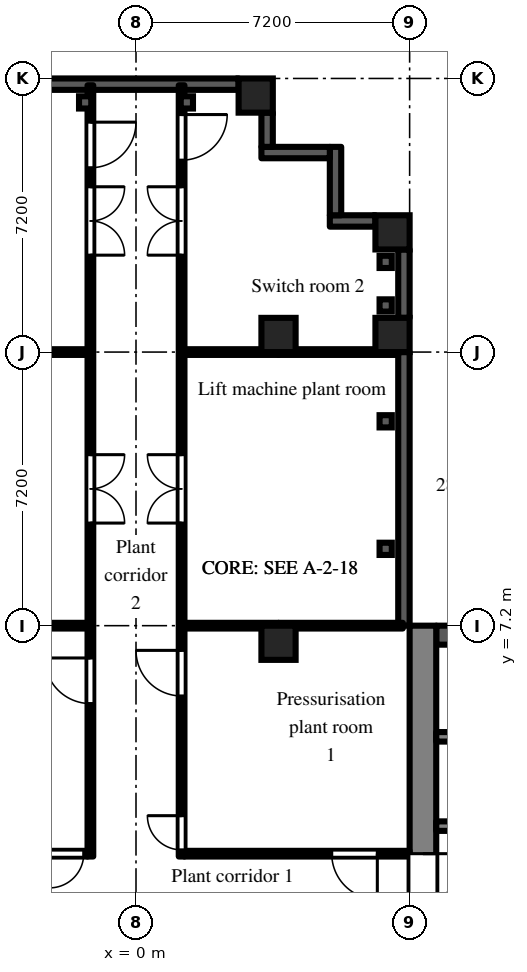
"""IFC4 building model, lengths in metres.
Left out: names, types, materials, properties, quantities, classifications, styles, units other than length and angle.
Written with IfcOpenShell. Run it as: python <this file> out.ifc"""

import sys

from ifc_helpers import new_model, si_unit, direction, frame, frame_2d, origin, origin_2d, place, context, subcontext, project, spatial, rectangle, extrude, element, fill, save


model = new_model("IFC4")
c1 = context("Model", 3, precision=1e-05, world=origin(), true_north=direction((0.0, 1.0)))
c2 = subcontext(c1, "Body", "Model", "MODEL_VIEW")
j1 = project(units=[si_unit("LENGTHUNIT", "METRE"), si_unit("PLANEANGLEUNIT", "RADIAN")], contexts=[c1])
p1 = place(None, origin())
s1 = spatial("IfcSite", under=j1, at=p1, CompositionType="ELEMENT")
p2 = place(p1, origin())
s2 = spatial("IfcBuilding", under=s1, at=p2, CompositionType="ELEMENT")
p3 = place(p2, frame((0.0, 0.0, 111.9)))
s3 = spatial("IfcBuildingStorey", under=s2, at=p3, CompositionType="ELEMENT", Elevation=111.9)
for number, where, z_axis, x_axis in (
    (1, (3.15, 21.15, 0.0), (0.0, 0.0, 1.0), (1.0, 0.0, 0.0)),
    (2, (3.75, 6.75, 0.0), (0.0, 0.0, 1.0), (1.0, 0.0, 0.0)),
    (3, (3.75, 14.85, 0.0), (0.0, 0.0, 1.0), (1.0, 0.0, 0.0)),
    (4, (6.75, 14.85, 0.0), (0.0, 0.0, 1.0), (1.0, 0.0, 0.0)),
    (5, (6.75, 17.55, 0.0), (0.0, 0.0, 1.0), (1.0, 0.0, 0.0)),
):
    element("IfcColumn", number, at=place(p3, frame(where, z_axis=z_axis, x_axis=x_axis)), inside=s3, PredefinedType="COLUMN", context=c2, shape_type="SweptSolid", body=[
        extrude(rectangle(XDim=0.9, YDim=0.9, at=origin_2d()), origin(), (0.0, 0.0, 1.0), 4.2),
    ])
p4 = place(p3, frame((7.05, 7.2, 0.0), z_axis=(0.0, 0.0, 1.0), x_axis=(0.0, 1.0, 0.0)))
e6 = element("IfcWall", 6, at=p4, inside=s3, PredefinedType="SOLIDWALL", context=c2, shape_type="SweptSolid", body=[
    extrude(rectangle(XDim=7.2, YDim=0.3, at=frame_2d((3.6, 0.0))), origin(), (0.0, 0.0, 1.0), 3.8),
])
p5 = place(p3, frame((7.05, 15.3, 0.0), z_axis=(0.0, 0.0, 1.0), x_axis=(0.0, 1.0, 0.0)))
e7 = element("IfcWall", 7, at=p5, inside=s3, PredefinedType="SOLIDWALL", context=c2, shape_type="SweptSolid", body=[
    extrude(rectangle(XDim=1.8, YDim=0.3, at=frame_2d((0.9, 0.0))), origin(), (0.0, 0.0, 1.0), 3.4),
])
p6 = place(p3, frame((6.3, 17.85, 0.0), z_axis=(0.0, 0.0, 1.0), x_axis=(-1.0, 0.0, 0.0)))
e8 = element("IfcWall", 8, at=p6, inside=s3, PredefinedType="SOLIDWALL", context=c2, shape_type="SweptSolid", body=[
    extrude(rectangle(XDim=1.2, YDim=0.3, at=frame_2d((0.6, 0.0))), origin(), (0.0, 0.0, 1.0), 3.8),
])
for number, where, z_axis, x_axis in (
    (9, (5.25, 18.0, 0.0), (0.0, 0.0, 1.0), (0.0, 1.0, 0.0)),
    (10, (5.1, 19.65, 0.0), (0.0, 0.0, 1.0), (-1.0, 0.0, 0.0)),
):
    element("IfcWall", number, at=place(p3, frame(where, z_axis=z_axis, x_axis=x_axis)), inside=s3, PredefinedType="SOLIDWALL", context=c2, shape_type="SweptSolid", body=[
        extrude(rectangle(XDim=1.8, YDim=0.3, at=frame_2d((0.9, 0.0))), origin(), (0.0, 0.0, 1.0), 3.8),
    ])
p7 = place(p3, frame((3.45, 19.8, 0.0), z_axis=(0.0, 0.0, 1.0), x_axis=(0.0, 1.0, 0.0)))
e11 = element("IfcWall", 11, at=p7, inside=s3, PredefinedType="SOLIDWALL", context=c2, shape_type="SweptSolid", body=[
    extrude(rectangle(XDim=0.9, YDim=0.3, at=frame_2d((0.45, 0.0))), origin(), (0.0, 0.0, 1.0), 3.8),
])
p8 = place(p3, frame((2.7, 21.45, 0.0), z_axis=(0.0, 0.0, 1.0), x_axis=(-1.0, 0.0, 0.0)))
e12 = element("IfcWall", 12, at=p8, inside=s3, PredefinedType="SOLIDWALL", context=c2, shape_type="SweptSolid", body=[
    extrude(rectangle(XDim=5.4, YDim=0.3, at=frame_2d((2.7, 0.0))), origin(), (0.0, 0.0, 1.0), 3.4),
])
p9 = place(p3, frame((7.55, -7.2, 0.0), z_axis=(0.0, 0.0, 1.0), x_axis=(0.0, 1.0, 0.0)))
e13 = element("IfcWall", 13, at=p9, inside=s3, PredefinedType="SHEAR", context=c2, shape_type="SweptSolid", body=[
    extrude(rectangle(XDim=14.4, YDim=0.7, at=frame_2d((7.2, 0.0))), origin(), (0.0, 0.0, 1.0), 3.8),
])
p10 = place(p9, frame((6.0, 0.0, 0.0)))
e14 = element("IfcOpeningElement", 14, at=p10, cuts=e13, PredefinedType="OPENING", context=c2, shape_type="SweptSolid", body=[
    extrude(rectangle(XDim=2.4, YDim=2.2, at=frame_2d((1.2, 1.1))), frame((0.0, 0.36, 0.0), z_axis=(0.0, -1.0, 0.0), x_axis=(1.0, 0.0, 0.0)), (0.0, 0.0, 1.0), 0.72),
])
p11 = place(p3, frame((7.9, 6.95, 0.0), z_axis=(0.0, 0.0, 1.0), x_axis=(1.0, 0.0, 0.0)))
e15 = element("IfcWall", 15, at=p11, inside=s3, PredefinedType="SHEAR", context=c2, shape_type="SweptSolid", body=[
    extrude(rectangle(XDim=12.95, YDim=0.5, at=frame_2d((6.475, 0.0))), origin(), (0.0, 0.0, 1.0), 3.8),
])
p12 = place(p3, frame((7.9, 1.925, 0.0), z_axis=(0.0, 0.0, 1.0), x_axis=(1.0, 0.0, 0.0)))
e16 = element("IfcWall", 16, at=p12, inside=s3, PredefinedType="SHEAR", context=c2, shape_type="SweptSolid", body=[
    extrude(rectangle(XDim=12.95, YDim=0.25, at=frame_2d((6.475, 0.0))), origin(), (0.0, 0.0, 1.0), 3.8),
])
p13 = place(p12, frame((0.525, 0.0, 0.0)))
e17 = element("IfcOpeningElement", 17, at=p13, cuts=e16, PredefinedType="OPENING", context=c2, shape_type="SweptSolid", body=[
    extrude(rectangle(XDim=0.9, YDim=2.1, at=frame_2d((0.45, 1.05))), frame((0.0, 0.135, 0.0), z_axis=(0.0, -1.0, 0.0), x_axis=(1.0, 0.0, 0.0)), (0.0, 0.0, 1.0), 0.27),
])
p14 = place(p12, frame((2.625, 0.0, 0.0)))
e18 = element("IfcOpeningElement", 18, at=p14, cuts=e16, PredefinedType="OPENING", context=c2, shape_type="SweptSolid", body=[
    extrude(rectangle(XDim=1.1, YDim=2.1, at=frame_2d((0.55, 1.05))), frame((0.0, 0.135, 0.0), z_axis=(0.0, -1.0, 0.0), x_axis=(1.0, 0.0, 0.0)), (0.0, 0.0, 1.0), 0.27),
])
p15 = place(p3, frame((7.9, 4.275, 0.0), z_axis=(0.0, 0.0, 1.0), x_axis=(1.0, 0.0, 0.0)))
e19 = element("IfcWall", 19, at=p15, inside=s3, PredefinedType="SHEAR", context=c2, shape_type="SweptSolid", body=[
    extrude(rectangle(XDim=1.95, YDim=0.25, at=frame_2d((0.975, 0.0))), origin(), (0.0, 0.0, 1.0), 3.8),
])
p16 = place(p3, frame((-7.2, 1.2, 0.0), z_axis=(0.0, 0.0, 1.0), x_axis=(1.0, 0.0, 0.0)))
e20 = element("IfcWall", 20, at=p16, inside=s3, PredefinedType="PARTITIONING", context=c2, shape_type="SweptSolid", body=[
    extrude(rectangle(XDim=5.925, YDim=0.15, at=frame_2d((2.962, 0.0))), origin(), (0.0, 0.0, 1.0), 3.8),
])
p17 = place(p16, frame((0.65, 0.0, 0.0)))
e21 = element("IfcOpeningElement", 21, at=p17, cuts=e20, PredefinedType="OPENING", context=c2, shape_type="SweptSolid", body=[
    extrude(rectangle(XDim=1.2, YDim=2.1, at=frame_2d((0.6, 1.05))), frame((0.0, 0.085, 0.0), z_axis=(0.0, -1.0, 0.0), x_axis=(1.0, 0.0, 0.0)), (0.0, 0.0, 1.0), 0.17),
])
p18 = place(p16, frame((4.925, 0.0, 0.0)))
e22 = element("IfcOpeningElement", 22, at=p18, cuts=e20, PredefinedType="OPENING", context=c2, shape_type="SweptSolid", body=[
    extrude(rectangle(XDim=0.9, YDim=2.1, at=frame_2d((0.45, 1.05))), frame((0.0, 0.085, 0.0), z_axis=(0.0, -1.0, 0.0), x_axis=(1.0, 0.0, 0.0)), (0.0, 0.0, 1.0), 0.17),
])
p19 = place(p3, frame((-1.2, 1.125, 0.0), z_axis=(0.0, 0.0, 1.0), x_axis=(0.0, 1.0, 0.0)))
e23 = element("IfcWall", 23, at=p19, inside=s3, PredefinedType="PARTITIONING", context=c2, shape_type="SweptSolid", body=[
    extrude(rectangle(XDim=20.295, YDim=0.15, at=frame_2d((10.147, 0.0))), origin(), (0.0, 0.0, 1.0), 3.8),
])
p20 = place(p19, frame((4.025, 0.0, 0.0)))
e24 = element("IfcOpeningElement", 24, at=p20, cuts=e23, PredefinedType="OPENING", context=c2, shape_type="SweptSolid", body=[
    extrude(rectangle(XDim=1.2, YDim=2.1, at=frame_2d((0.6, 1.05))), frame((0.0, 0.085, 0.0), z_axis=(0.0, -1.0, 0.0), x_axis=(1.0, 0.0, 0.0)), (0.0, 0.0, 1.0), 0.17),
])
p21 = place(p19, frame((8.775, 0.0, 0.0)))
e25 = element("IfcOpeningElement", 25, at=p21, cuts=e23, PredefinedType="OPENING", context=c2, shape_type="SweptSolid", body=[
    extrude(rectangle(XDim=1.8, YDim=2.1, at=frame_2d((0.9, 1.05))), frame((0.0, 0.085, 0.0), z_axis=(0.0, -1.0, 0.0), x_axis=(1.0, 0.0, 0.0)), (0.0, 0.0, 1.0), 0.17),
])
p22 = place(p19, frame((15.825, 0.0, 0.0)))
e26 = element("IfcOpeningElement", 26, at=p22, cuts=e23, PredefinedType="OPENING", context=c2, shape_type="SweptSolid", body=[
    extrude(rectangle(XDim=1.8, YDim=2.1, at=frame_2d((0.9, 1.05))), frame((0.0, 0.085, 0.0), z_axis=(0.0, -1.0, 0.0), x_axis=(1.0, 0.0, 0.0)), (0.0, 0.0, 1.0), 0.17),
])
p23 = place(p19, frame((18.125, 0.0, 0.0)))
e27 = element("IfcOpeningElement", 27, at=p23, cuts=e23, PredefinedType="OPENING", context=c2, shape_type="SweptSolid", body=[
    extrude(rectangle(XDim=1.2, YDim=2.1, at=frame_2d((0.6, 1.05))), frame((0.0, 0.085, 0.0), z_axis=(0.0, -1.0, 0.0), x_axis=(1.0, 0.0, 0.0)), (0.0, 0.0, 1.0), 0.17),
])
p24 = place(p3, frame((1.2, 1.125, 0.0), z_axis=(0.0, 0.0, 1.0), x_axis=(0.0, 1.0, 0.0)))
e28 = element("IfcWall", 28, at=p24, inside=s3, PredefinedType="PARTITIONING", context=c2, shape_type="SweptSolid", body=[
    extrude(rectangle(XDim=20.295, YDim=0.15, at=frame_2d((10.147, 0.0))), origin(), (0.0, 0.0, 1.0), 3.8),
])
p25 = place(p24, frame((0.175, 0.0, 0.0)))
e29 = element("IfcOpeningElement", 29, at=p25, cuts=e28, PredefinedType="OPENING", context=c2, shape_type="SweptSolid", body=[
    extrude(rectangle(XDim=0.9, YDim=2.1, at=frame_2d((0.45, 1.05))), frame((0.0, 0.085, 0.0), z_axis=(0.0, -1.0, 0.0), x_axis=(1.0, 0.0, 0.0)), (0.0, 0.0, 1.0), 0.17),
])
p26 = place(p24, frame((4.225, 0.0, 0.0)))
e30 = element("IfcOpeningElement", 30, at=p26, cuts=e28, PredefinedType="OPENING", context=c2, shape_type="SweptSolid", body=[
    extrude(rectangle(XDim=1.2, YDim=2.1, at=frame_2d((0.6, 1.05))), frame((0.0, 0.085, 0.0), z_axis=(0.0, -1.0, 0.0), x_axis=(1.0, 0.0, 0.0)), (0.0, 0.0, 1.0), 0.17),
])
p27 = place(p24, frame((8.775, 0.0, 0.0)))
e31 = element("IfcOpeningElement", 31, at=p27, cuts=e28, PredefinedType="OPENING", context=c2, shape_type="SweptSolid", body=[
    extrude(rectangle(XDim=1.8, YDim=2.1, at=frame_2d((0.9, 1.05))), frame((0.0, 0.085, 0.0), z_axis=(0.0, -1.0, 0.0), x_axis=(1.0, 0.0, 0.0)), (0.0, 0.0, 1.0), 0.17),
])
p28 = place(p24, frame((15.825, 0.0, 0.0)))
e32 = element("IfcOpeningElement", 32, at=p28, cuts=e28, PredefinedType="OPENING", context=c2, shape_type="SweptSolid", body=[
    extrude(rectangle(XDim=1.8, YDim=2.1, at=frame_2d((0.9, 1.05))), frame((0.0, 0.085, 0.0), z_axis=(0.0, -1.0, 0.0), x_axis=(1.0, 0.0, 0.0)), (0.0, 0.0, 1.0), 0.17),
])
p29 = place(p24, frame((18.325, 0.0, 0.0)))
e33 = element("IfcOpeningElement", 33, at=p29, cuts=e28, PredefinedType="OPENING", context=c2, shape_type="SweptSolid", body=[
    extrude(rectangle(XDim=1.2, YDim=2.1, at=frame_2d((0.6, 1.05))), frame((0.0, 0.085, 0.0), z_axis=(0.0, -1.0, 0.0), x_axis=(1.0, 0.0, 0.0)), (0.0, 0.0, 1.0), 0.17),
])
p30 = place(p3, frame((1.275, 1.2, 0.0), z_axis=(0.0, 0.0, 1.0), x_axis=(1.0, 0.0, 0.0)))
e34 = element("IfcWall", 34, at=p30, inside=s3, PredefinedType="PARTITIONING", context=c2, shape_type="SweptSolid", body=[
    extrude(rectangle(XDim=5.925, YDim=0.15, at=frame_2d((2.962, 0.0))), origin(), (0.0, 0.0, 1.0), 3.8),
])
p31 = place(p30, frame((3.875, 0.0, 0.0)))
e35 = element("IfcOpeningElement", 35, at=p31, cuts=e34, PredefinedType="OPENING", context=c2, shape_type="SweptSolid", body=[
    extrude(rectangle(XDim=1.2, YDim=2.1, at=frame_2d((0.6, 1.05))), frame((0.0, 0.085, 0.0), z_axis=(0.0, -1.0, 0.0), x_axis=(1.0, 0.0, 0.0)), (0.0, 0.0, 1.0), 0.17),
])
for number, where, z_axis, x_axis in (
    (36, (1.275, 7.2, 0.0), (0.0, 0.0, 1.0), (1.0, 0.0, 0.0)),
    (37, (1.275, 14.4, 0.0), (0.0, 0.0, 1.0), (1.0, 0.0, 0.0)),
    (38, (-3.75, 7.2, 0.0), (0.0, 0.0, 1.0), (1.0, 0.0, 0.0)),
    (39, (-3.75, 14.4, 0.0), (0.0, 0.0, 1.0), (1.0, 0.0, 0.0)),
):
    element("IfcWall", number, at=place(p3, frame(where, z_axis=z_axis, x_axis=x_axis)), inside=s3, PredefinedType="PARTITIONING", context=c2, shape_type="SweptSolid", body=[
        extrude(rectangle(XDim=2.475, YDim=0.15, at=frame_2d((1.238, 0.0))), origin(), (0.0, 0.0, 1.0), 3.8),
    ])
p32 = place(p3, frame((3.75, 7.2, 0.0), z_axis=(0.0, 0.0, 1.0), x_axis=(1.0, 0.0, 0.0)))
e40 = element("IfcWall", 40, at=p32, inside=s3, PredefinedType="PARTITIONING", context=c2, shape_type="SweptSolid", body=[
    extrude(rectangle(XDim=3.27, YDim=0.15, at=frame_2d((1.635, 0.0))), origin(), (0.0, 0.0, 1.0), 3.4),
])
p33 = place(p3, frame((3.75, 14.4, 0.0), z_axis=(0.0, 0.0, 1.0), x_axis=(1.0, 0.0, 0.0)))
e41 = element("IfcWall", 41, at=p33, inside=s3, PredefinedType="PARTITIONING", context=c2, shape_type="SweptSolid", body=[
    extrude(rectangle(XDim=3.15, YDim=0.15, at=frame_2d((1.575, 0.0))), origin(), (0.0, 0.0, 1.0), 3.4),
])
p34 = place(p10, frame((2.4, 0.0, 0.0), z_axis=(0.0, 0.0, 1.0), x_axis=(-1.0, 0.0, 0.0)))
e42 = element("IfcDoor", 42, at=p34, inside=s3, OperationType="DOUBLE_DOOR_DOUBLE_SWING", PredefinedType="DOOR", context=c2, shape_type="SweptSolid", body=[
    extrude(rectangle(XDim=2.4, YDim=2.2, at=frame_2d((1.2, 1.1))), frame((0.0, 0.025, 0.0), z_axis=(0.0, -1.0, 0.0), x_axis=(1.0, 0.0, 0.0)), (0.0, 0.0, 1.0), 0.05),
])
fill(e14, e42)
p35 = place(p25, origin())
e43 = element("IfcDoor", 43, at=p35, inside=s3, OperationType="SINGLE_SWING_RIGHT", PredefinedType="DOOR", context=c2, shape_type="SweptSolid", body=[
    extrude(rectangle(XDim=0.9, YDim=2.1, at=frame_2d((0.45, 1.05))), frame((0.0, 0.025, 0.0), z_axis=(0.0, -1.0, 0.0), x_axis=(1.0, 0.0, 0.0)), (0.0, 0.0, 1.0), 0.05),
])
fill(e29, e43)
p36 = place(p26, origin())
e44 = element("IfcDoor", 44, at=p36, inside=s3, OperationType="SINGLE_SWING_RIGHT", PredefinedType="DOOR", context=c2, shape_type="SweptSolid", body=[
    extrude(rectangle(XDim=1.2, YDim=2.1, at=frame_2d((0.6, 1.05))), frame((0.0, 0.025, 0.0), z_axis=(0.0, -1.0, 0.0), x_axis=(1.0, 0.0, 0.0)), (0.0, 0.0, 1.0), 0.05),
])
fill(e30, e44)
p37 = place(p31, frame((1.2, 0.0, 0.0), z_axis=(0.0, 0.0, 1.0), x_axis=(-1.0, 0.0, 0.0)))
e45 = element("IfcDoor", 45, at=p37, inside=s3, OperationType="SINGLE_SWING_LEFT", PredefinedType="DOOR", context=c2, shape_type="SweptSolid", body=[
    extrude(rectangle(XDim=1.2, YDim=2.1, at=frame_2d((0.6, 1.05))), frame((0.0, 0.025, 0.0), z_axis=(0.0, -1.0, 0.0), x_axis=(1.0, 0.0, 0.0)), (0.0, 0.0, 1.0), 0.05),
])
fill(e35, e45)
p38 = place(p18, frame((0.9, 0.0, 0.0), z_axis=(0.0, 0.0, 1.0), x_axis=(-1.0, 0.0, 0.0)))
e46 = element("IfcDoor", 46, at=p38, inside=s3, OperationType="SINGLE_SWING_RIGHT", PredefinedType="DOOR", context=c2, shape_type="SweptSolid", body=[
    extrude(rectangle(XDim=0.9, YDim=2.1, at=frame_2d((0.45, 1.05))), frame((0.0, 0.025, 0.0), z_axis=(0.0, -1.0, 0.0), x_axis=(1.0, 0.0, 0.0)), (0.0, 0.0, 1.0), 0.05),
])
fill(e22, e46)
p39 = place(p20, origin())
e47 = element("IfcDoor", 47, at=p39, inside=s3, OperationType="SINGLE_SWING_RIGHT", PredefinedType="DOOR", context=c2, shape_type="SweptSolid", body=[
    extrude(rectangle(XDim=1.2, YDim=2.1, at=frame_2d((0.6, 1.05))), frame((0.0, 0.025, 0.0), z_axis=(0.0, -1.0, 0.0), x_axis=(1.0, 0.0, 0.0)), (0.0, 0.0, 1.0), 0.05),
])
fill(e24, e47)
p40 = place(p21, frame((1.8, 0.0, 0.0), z_axis=(0.0, 0.0, 1.0), x_axis=(-1.0, 0.0, 0.0)))
e48 = element("IfcDoor", 48, at=p40, inside=s3, OperationType="DOUBLE_DOOR_DOUBLE_SWING", PredefinedType="DOOR", context=c2, shape_type="SweptSolid", body=[
    extrude(rectangle(XDim=1.8, YDim=2.1, at=frame_2d((0.9, 1.05))), frame((0.0, 0.025, 0.0), z_axis=(0.0, -1.0, 0.0), x_axis=(1.0, 0.0, 0.0)), (0.0, 0.0, 1.0), 0.05),
])
fill(e25, e48)
p41 = place(p22, frame((1.8, 0.0, 0.0), z_axis=(0.0, 0.0, 1.0), x_axis=(-1.0, 0.0, 0.0)))
e49 = element("IfcDoor", 49, at=p41, inside=s3, OperationType="DOUBLE_DOOR_DOUBLE_SWING", PredefinedType="DOOR", context=c2, shape_type="SweptSolid", body=[
    extrude(rectangle(XDim=1.8, YDim=2.1, at=frame_2d((0.9, 1.05))), frame((0.0, 0.025, 0.0), z_axis=(0.0, -1.0, 0.0), x_axis=(1.0, 0.0, 0.0)), (0.0, 0.0, 1.0), 0.05),
])
fill(e26, e49)
p42 = place(p23, frame((1.2, 0.0, 0.0), z_axis=(0.0, 0.0, 1.0), x_axis=(-1.0, 0.0, 0.0)))
e50 = element("IfcDoor", 50, at=p42, inside=s3, OperationType="SINGLE_SWING_LEFT", PredefinedType="DOOR", context=c2, shape_type="SweptSolid", body=[
    extrude(rectangle(XDim=1.2, YDim=2.1, at=frame_2d((0.6, 1.05))), frame((0.0, 0.025, 0.0), z_axis=(0.0, -1.0, 0.0), x_axis=(1.0, 0.0, 0.0)), (0.0, 0.0, 1.0), 0.05),
])
fill(e27, e50)
p43 = place(p27, origin())
e51 = element("IfcDoor", 51, at=p43, inside=s3, OperationType="DOUBLE_DOOR_DOUBLE_SWING", PredefinedType="DOOR", context=c2, shape_type="SweptSolid", body=[
    extrude(rectangle(XDim=1.8, YDim=2.1, at=frame_2d((0.9, 1.05))), frame((0.0, 0.025, 0.0), z_axis=(0.0, -1.0, 0.0), x_axis=(1.0, 0.0, 0.0)), (0.0, 0.0, 1.0), 0.05),
])
fill(e31, e51)
p44 = place(p28, origin())
e52 = element("IfcDoor", 52, at=p44, inside=s3, OperationType="DOUBLE_DOOR_DOUBLE_SWING", PredefinedType="DOOR", context=c2, shape_type="SweptSolid", body=[
    extrude(rectangle(XDim=1.8, YDim=2.1, at=frame_2d((0.9, 1.05))), frame((0.0, 0.025, 0.0), z_axis=(0.0, -1.0, 0.0), x_axis=(1.0, 0.0, 0.0)), (0.0, 0.0, 1.0), 0.05),
])
fill(e32, e52)
p45 = place(p29, frame((1.2, 0.0, 0.0), z_axis=(0.0, 0.0, 1.0), x_axis=(-1.0, 0.0, 0.0)))
e53 = element("IfcDoor", 53, at=p45, inside=s3, OperationType="SINGLE_SWING_LEFT", PredefinedType="DOOR", context=c2, shape_type="SweptSolid", body=[
    extrude(rectangle(XDim=1.2, YDim=2.1, at=frame_2d((0.6, 1.05))), frame((0.0, 0.025, 0.0), z_axis=(0.0, -1.0, 0.0), x_axis=(1.0, 0.0, 0.0)), (0.0, 0.0, 1.0), 0.05),
])
fill(e33, e53)
save(model, sys.argv[1])
